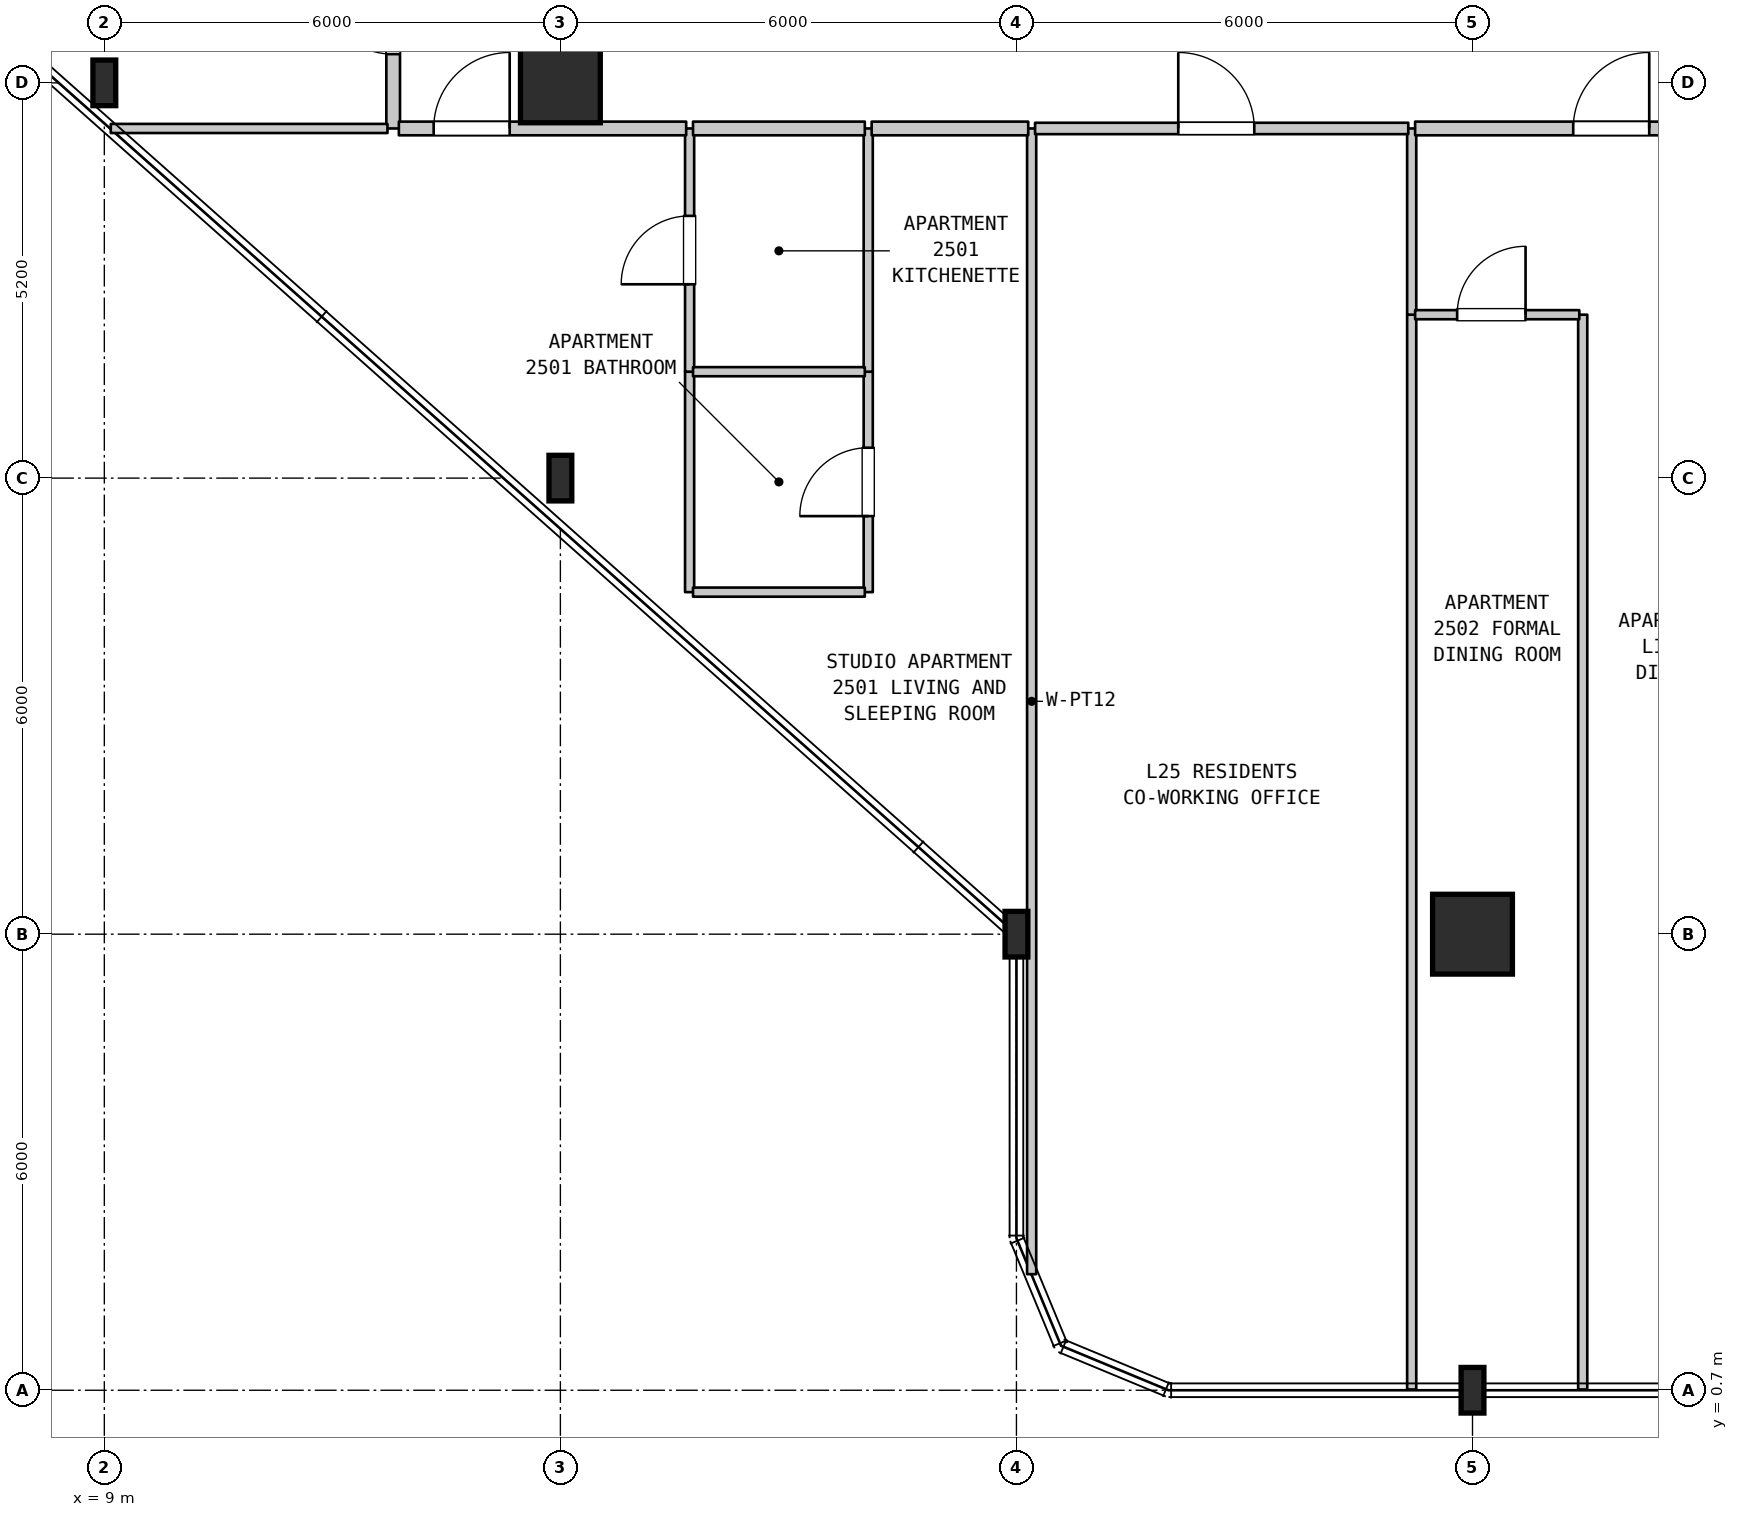
"""IFC4 building model, lengths in metres.
Left out: names, types, materials, properties, quantities, classifications, styles, units other than length and angle.
Written with IfcOpenShell. Run it as: python <this file> out.ifc"""

import sys

from ifc_helpers import new_model, si_unit, direction, frame, frame_2d, origin, origin_2d, place, context, subcontext, project, spatial, rectangle, i_section, extrude, element, fill, save


model = new_model("IFC4")
c1 = context("Model", 3, precision=1e-05, world=origin(), true_north=direction((0.0, 1.0)))
c2 = subcontext(c1, "Body", "Model", "MODEL_VIEW")
j1 = project(units=[si_unit("LENGTHUNIT", "METRE"), si_unit("PLANEANGLEUNIT", "RADIAN")], contexts=[c1])
p1 = place(None, origin())
s1 = spatial("IfcSite", under=j1, at=p1, CompositionType="ELEMENT")
p2 = place(p1, origin())
s2 = spatial("IfcBuilding", under=s1, at=p2, CompositionType="ELEMENT")
p3 = place(p2, frame((0.0, 0.0, 105.7)))
s3 = spatial("IfcBuildingStorey", under=s2, at=p3, CompositionType="ELEMENT", Elevation=105.7)
for number, where, z_axis, x_axis in (
    (1, (9.0, 17.9, 0.0), (0.0, 0.0, 1.0), (1.0, 0.0, 0.0)),
    (2, (15.0, 12.7, 0.0), (0.0, 0.0, 1.0), (1.0, 0.0, 0.0)),
):
    element("IfcColumn", number, at=place(p3, frame(where, z_axis=z_axis, x_axis=x_axis)), inside=s3, PredefinedType="COLUMN", context=c2, shape_type="SweptSolid", body=[
        extrude(i_section(OverallWidth=0.3, OverallDepth=0.6, WebThickness=0.015, FlangeThickness=0.03, FilletRadius=0.027, at=origin_2d()), origin(), (0.0, 0.0, 1.0), 3.7),
    ])
p4 = place(p3, frame((15.0, 17.9, 0.0), z_axis=(0.0, 0.0, 1.0), x_axis=(1.0, 0.0, 0.0)))
e3 = element("IfcColumn", 3, at=p4, inside=s3, PredefinedType="COLUMN", context=c2, shape_type="SweptSolid", body=[
    extrude(rectangle(XDim=1.05, YDim=1.05, at=origin_2d()), origin(), (0.0, 0.0, 1.0), 3.7),
])
for number, where, z_axis, x_axis in (
    (4, (21.0, 6.7, 0.0), (0.0, 0.0, 1.0), (1.0, 0.0, 0.0)),
    (5, (27.0, 0.7, 0.0), (0.0, 0.0, 1.0), (1.0, 0.0, 0.0)),
):
    element("IfcColumn", number, at=place(p3, frame(where, z_axis=z_axis, x_axis=x_axis)), inside=s3, PredefinedType="COLUMN", context=c2, shape_type="SweptSolid", body=[
        extrude(i_section(OverallWidth=0.3, OverallDepth=0.6, WebThickness=0.015, FlangeThickness=0.03, FilletRadius=0.027, at=origin_2d()), origin(), (0.0, 0.0, 1.0), 3.7),
    ])
p5 = place(p3, frame((27.0, 6.7, 0.0), z_axis=(0.0, 0.0, 1.0), x_axis=(1.0, 0.0, 0.0)))
e6 = element("IfcColumn", 6, at=p5, inside=s3, PredefinedType="COLUMN", context=c2, shape_type="SweptSolid", body=[
    extrude(rectangle(XDim=1.05, YDim=1.05, at=origin_2d()), origin(), (0.0, 0.0, 1.0), 3.7),
])
p6 = place(p3, frame((12.8, 17.3, 0.0), z_axis=(0.0, 0.0, 1.0), x_axis=(0.0, 1.0, 0.0)))
e7 = element("IfcWall", 7, at=p6, inside=s3, PredefinedType="STANDARD", context=c2, shape_type="SweptSolid", body=[
    extrude(rectangle(XDim=3.1, YDim=0.18, at=frame_2d((1.55, 0.0))), origin(), (0.0, 0.0, 1.0), 3.385),
])
p7 = place(p6, frame((0.978, 0.0, 0.0)))
e8 = element("IfcOpeningElement", 8, at=p7, cuts=e7, PredefinedType="OPENING", context=c2, shape_type="SweptSolid", body=[
    extrude(rectangle(XDim=1.0, YDim=2.15, at=frame_2d((0.5, 1.075))), frame((0.0, 0.1, 0.0), z_axis=(0.0, -1.0, 0.0), x_axis=(1.0, 0.0, 0.0)), (0.0, 0.0, 1.0), 0.2),
])
p8 = place(p3, frame((16.7, 11.2, 0.0), z_axis=(0.0, 0.0, 1.0), x_axis=(0.0, 1.0, 0.0)))
e9 = element("IfcWall", 9, at=p8, inside=s3, PredefinedType="PARTITIONING", context=c2, shape_type="SweptSolid", body=[
    extrude(rectangle(XDim=2.9, YDim=0.12, at=frame_2d((1.45, 0.0))), origin(), (0.0, 0.0, 1.0), 3.385),
])
p9 = place(p3, frame((16.7, 14.1, 0.0), z_axis=(0.0, 0.0, 1.0), x_axis=(0.0, 1.0, 0.0)))
e10 = element("IfcWall", 10, at=p9, inside=s3, PredefinedType="PARTITIONING", context=c2, shape_type="SweptSolid", body=[
    extrude(rectangle(XDim=3.2, YDim=0.12, at=frame_2d((1.6, 0.0))), origin(), (0.0, 0.0, 1.0), 3.385),
])
p10 = place(p9, frame((1.15, 0.0, 0.0)))
e11 = element("IfcOpeningElement", 11, at=p10, cuts=e10, PredefinedType="OPENING", context=c2, shape_type="SweptSolid", body=[
    extrude(rectangle(XDim=0.9, YDim=2.15, at=frame_2d((0.45, 1.075))), frame((0.0, 0.07, 0.0), z_axis=(0.0, -1.0, 0.0), x_axis=(1.0, 0.0, 0.0)), (0.0, 0.0, 1.0), 0.14),
])
p11 = place(p3, frame((19.05, 11.2, 0.0), z_axis=(0.0, 0.0, 1.0), x_axis=(0.0, 1.0, 0.0)))
e12 = element("IfcWall", 12, at=p11, inside=s3, PredefinedType="PARTITIONING", context=c2, shape_type="SweptSolid", body=[
    extrude(rectangle(XDim=2.9, YDim=0.12, at=frame_2d((1.45, 0.0))), origin(), (0.0, 0.0, 1.0), 3.385),
])
p12 = place(p11, frame((1.0, 0.0, 0.0)))
e13 = element("IfcOpeningElement", 13, at=p12, cuts=e12, PredefinedType="OPENING", context=c2, shape_type="SweptSolid", body=[
    extrude(rectangle(XDim=0.9, YDim=2.1, at=frame_2d((0.45, 1.05))), frame((0.0, 0.07, 0.0), z_axis=(0.0, -1.0, 0.0), x_axis=(1.0, 0.0, 0.0)), (0.0, 0.0, 1.0), 0.14),
])
p13 = place(p3, frame((19.05, 14.1, 0.0), z_axis=(0.0, 0.0, 1.0), x_axis=(0.0, 1.0, 0.0)))
e14 = element("IfcWall", 14, at=p13, inside=s3, PredefinedType="PARTITIONING", context=c2, shape_type="SweptSolid", body=[
    extrude(rectangle(XDim=3.2, YDim=0.12, at=frame_2d((1.6, 0.0))), origin(), (0.0, 0.0, 1.0), 3.385),
])
p14 = place(p3, frame((21.2, 2.227, 0.0), z_axis=(0.0, 0.0, 1.0), x_axis=(0.0, 1.0, 0.0)))
e15 = element("IfcWall", 15, at=p14, inside=s3, PredefinedType="PARTITIONING", context=c2, shape_type="SweptSolid", body=[
    extrude(rectangle(XDim=15.073, YDim=0.12, at=frame_2d((7.537, 0.0))), origin(), (0.0, 0.0, 1.0), 3.385),
])
p15 = place(p3, frame((26.2, 0.71, 0.0), z_axis=(0.0, 0.0, 1.0), x_axis=(0.0, 1.0, 0.0)))
e16 = element("IfcWall", 16, at=p15, inside=s3, PredefinedType="PARTITIONING", context=c2, shape_type="SweptSolid", body=[
    extrude(rectangle(XDim=14.14, YDim=0.12, at=frame_2d((7.07, 0.0))), origin(), (0.0, 0.0, 1.0), 3.385),
])
p16 = place(p3, frame((26.2, 14.85, 0.0), z_axis=(0.0, 0.0, 1.0), x_axis=(0.0, 1.0, 0.0)))
e17 = element("IfcWall", 17, at=p16, inside=s3, PredefinedType="PARTITIONING", context=c2, shape_type="SweptSolid", body=[
    extrude(rectangle(XDim=2.45, YDim=0.12, at=frame_2d((1.225, 0.0))), origin(), (0.0, 0.0, 1.0), 3.385),
])
p17 = place(p3, frame((28.45, 0.71, 0.0), z_axis=(0.0, 0.0, 1.0), x_axis=(0.0, 1.0, 0.0)))
e18 = element("IfcWall", 18, at=p17, inside=s3, PredefinedType="PARTITIONING", context=c2, shape_type="SweptSolid", body=[
    extrude(rectangle(XDim=14.14, YDim=0.12, at=frame_2d((7.07, 0.0))), origin(), (0.0, 0.0, 1.0), 3.385),
])
for number, where, z_axis, x_axis in (
    (19, (16.745, 11.2, 0.0), (0.0, 0.0, 1.0), (1.0, 0.0, 0.0)),
    (20, (16.745, 14.1, 0.0), (0.0, 0.0, 1.0), (1.0, 0.0, 0.0)),
):
    element("IfcWall", number, at=place(p3, frame(where, z_axis=z_axis, x_axis=x_axis)), inside=s3, PredefinedType="PARTITIONING", context=c2, shape_type="SweptSolid", body=[
        extrude(rectangle(XDim=2.26, YDim=0.12, at=frame_2d((1.13, 0.0))), origin(), (0.0, 0.0, 1.0), 3.385),
    ])
p18 = place(p3, frame((26.245, 14.85, 0.0), z_axis=(0.0, 0.0, 1.0), x_axis=(1.0, 0.0, 0.0)))
e21 = element("IfcWall", 21, at=p18, inside=s3, PredefinedType="PARTITIONING", context=c2, shape_type="SweptSolid", body=[
    extrude(rectangle(XDim=2.16, YDim=0.12, at=frame_2d((1.08, 0.0))), origin(), (0.0, 0.0, 1.0), 3.385),
])
p19 = place(p18, frame((0.553, 0.0, 0.0)))
e22 = element("IfcOpeningElement", 22, at=p19, cuts=e21, PredefinedType="OPENING", context=c2, shape_type="SweptSolid", body=[
    extrude(rectangle(XDim=0.9, YDim=2.15, at=frame_2d((0.45, 1.075))), frame((0.0, 0.07, 0.0), z_axis=(0.0, -1.0, 0.0), x_axis=(1.0, 0.0, 0.0)), (0.0, 0.0, 1.0), 0.14),
])
p20 = place(p3, frame((9.085, 17.3, 0.0), z_axis=(0.0, 0.0, 1.0), x_axis=(1.0, 0.0, 0.0)))
e23 = element("IfcWall", 23, at=p20, inside=s3, PredefinedType="PARTITIONING", context=c2, shape_type="SweptSolid", body=[
    extrude(rectangle(XDim=3.64, YDim=0.12, at=frame_2d((1.82, 0.0))), origin(), (0.0, 0.0, 1.0), 3.385),
])
p21 = place(p3, frame((12.875, 17.3, 0.0), z_axis=(0.0, 0.0, 1.0), x_axis=(1.0, 0.0, 0.0)))
e24 = element("IfcWall", 24, at=p21, inside=s3, PredefinedType="STANDARD", context=c2, shape_type="SweptSolid", body=[
    extrude(rectangle(XDim=3.78, YDim=0.18, at=frame_2d((1.89, 0.0))), origin(), (0.0, 0.0, 1.0), 3.385),
])
p22 = place(p21, frame((0.458, 0.0, 0.0)))
e25 = element("IfcOpeningElement", 25, at=p22, cuts=e24, PredefinedType="OPENING", context=c2, shape_type="SweptSolid", body=[
    extrude(rectangle(XDim=1.0, YDim=2.15, at=frame_2d((0.5, 1.075))), frame((0.0, 0.1, 0.0), z_axis=(0.0, -1.0, 0.0), x_axis=(1.0, 0.0, 0.0)), (0.0, 0.0, 1.0), 0.2),
])
p23 = place(p3, frame((16.745, 17.3, 0.0), z_axis=(0.0, 0.0, 1.0), x_axis=(1.0, 0.0, 0.0)))
e26 = element("IfcWall", 26, at=p23, inside=s3, PredefinedType="STANDARD", context=c2, shape_type="SweptSolid", body=[
    extrude(rectangle(XDim=2.26, YDim=0.18, at=frame_2d((1.13, 0.0))), origin(), (0.0, 0.0, 1.0), 3.385),
])
p24 = place(p3, frame((19.095, 17.3, 0.0), z_axis=(0.0, 0.0, 1.0), x_axis=(1.0, 0.0, 0.0)))
e27 = element("IfcWall", 27, at=p24, inside=s3, PredefinedType="STANDARD", context=c2, shape_type="SweptSolid", body=[
    extrude(rectangle(XDim=2.06, YDim=0.18, at=frame_2d((1.03, 0.0))), origin(), (0.0, 0.0, 1.0), 3.385),
])
p25 = place(p3, frame((21.245, 17.3, 0.0), z_axis=(0.0, 0.0, 1.0), x_axis=(1.0, 0.0, 0.0)))
e28 = element("IfcWall", 28, at=p25, inside=s3, PredefinedType="STANDARD", context=c2, shape_type="SweptSolid", body=[
    extrude(rectangle(XDim=4.91, YDim=0.15, at=frame_2d((2.455, 0.0))), origin(), (0.0, 0.0, 1.0), 3.385),
])
p26 = place(p25, frame((1.884, 0.0, 0.0)))
e29 = element("IfcOpeningElement", 29, at=p26, cuts=e28, PredefinedType="OPENING", context=c2, shape_type="SweptSolid", body=[
    extrude(rectangle(XDim=1.0, YDim=2.15, at=frame_2d((0.5, 1.075))), frame((0.0, 0.085, 0.0), z_axis=(0.0, -1.0, 0.0), x_axis=(1.0, 0.0, 0.0)), (0.0, 0.0, 1.0), 0.17),
])
p27 = place(p3, frame((26.245, 17.3, 0.0), z_axis=(0.0, 0.0, 1.0), x_axis=(1.0, 0.0, 0.0)))
e30 = element("IfcWall", 30, at=p27, inside=s3, PredefinedType="STANDARD", context=c2, shape_type="SweptSolid", body=[
    extrude(rectangle(XDim=5.095, YDim=0.18, at=frame_2d((2.547, 0.0))), origin(), (0.0, 0.0, 1.0), 3.385),
])
p28 = place(p27, frame((2.08, 0.0, 0.0)))
e31 = element("IfcOpeningElement", 31, at=p28, cuts=e30, PredefinedType="OPENING", context=c2, shape_type="SweptSolid", body=[
    extrude(rectangle(XDim=1.0, YDim=2.15, at=frame_2d((0.5, 1.075))), frame((0.0, 0.1, 0.0), z_axis=(0.0, -1.0, 0.0), x_axis=(1.0, 0.0, 0.0)), (0.0, 0.0, 1.0), 0.2),
])
p29 = place(p7, origin())
e32 = element("IfcDoor", 32, at=p29, inside=s3, OperationType="SINGLE_SWING_RIGHT", PredefinedType="DOOR", context=c2, shape_type="SweptSolid", body=[
    extrude(rectangle(XDim=1.0, YDim=2.15, at=frame_2d((0.5, 1.075))), frame((0.0, 0.025, 0.0), z_axis=(0.0, -1.0, 0.0), x_axis=(1.0, 0.0, 0.0)), (0.0, 0.0, 1.0), 0.05),
])
fill(e8, e32)
p30 = place(p10, origin())
e33 = element("IfcDoor", 33, at=p30, inside=s3, OperationType="SINGLE_SWING_LEFT", PredefinedType="DOOR", context=c2, shape_type="SweptSolid", body=[
    extrude(rectangle(XDim=0.9, YDim=2.15, at=frame_2d((0.45, 1.075))), frame((0.0, 0.025, 0.0), z_axis=(0.0, -1.0, 0.0), x_axis=(1.0, 0.0, 0.0)), (0.0, 0.0, 1.0), 0.05),
])
fill(e11, e33)
p31 = place(p12, origin())
e34 = element("IfcDoor", 34, at=p31, inside=s3, OperationType="SINGLE_SWING_LEFT", PredefinedType="DOOR", context=c2, shape_type="SweptSolid", body=[
    extrude(rectangle(XDim=0.9, YDim=2.1, at=frame_2d((0.45, 1.05))), frame((0.0, 0.025, 0.0), z_axis=(0.0, -1.0, 0.0), x_axis=(1.0, 0.0, 0.0)), (0.0, 0.0, 1.0), 0.05),
])
fill(e13, e34)
p32 = place(p19, origin())
e35 = element("IfcDoor", 35, at=p32, inside=s3, OperationType="SINGLE_SWING_RIGHT", PredefinedType="DOOR", context=c2, shape_type="SweptSolid", body=[
    extrude(rectangle(XDim=0.9, YDim=2.15, at=frame_2d((0.45, 1.075))), frame((0.0, 0.025, 0.0), z_axis=(0.0, -1.0, 0.0), x_axis=(1.0, 0.0, 0.0)), (0.0, 0.0, 1.0), 0.05),
])
fill(e22, e35)
p33 = place(p22, origin())
e36 = element("IfcDoor", 36, at=p33, inside=s3, OperationType="SINGLE_SWING_RIGHT", PredefinedType="DOOR", context=c2, shape_type="SweptSolid", body=[
    extrude(rectangle(XDim=1.0, YDim=2.15, at=frame_2d((0.5, 1.075))), frame((0.0, 0.025, 0.0), z_axis=(0.0, -1.0, 0.0), x_axis=(1.0, 0.0, 0.0)), (0.0, 0.0, 1.0), 0.05),
])
fill(e25, e36)
p34 = place(p26, origin())
e37 = element("IfcDoor", 37, at=p34, inside=s3, OperationType="SINGLE_SWING_LEFT", PredefinedType="DOOR", context=c2, shape_type="SweptSolid", body=[
    extrude(rectangle(XDim=1.0, YDim=2.15, at=frame_2d((0.5, 1.075))), frame((0.0, 0.025, 0.0), z_axis=(0.0, -1.0, 0.0), x_axis=(1.0, 0.0, 0.0)), (0.0, 0.0, 1.0), 0.05),
])
fill(e29, e37)
p35 = place(p28, origin())
e38 = element("IfcDoor", 38, at=p35, inside=s3, OperationType="SINGLE_SWING_RIGHT", PredefinedType="DOOR", context=c2, shape_type="SweptSolid", body=[
    extrude(rectangle(XDim=1.0, YDim=2.15, at=frame_2d((0.5, 1.075))), frame((0.0, 0.025, 0.0), z_axis=(0.0, -1.0, 0.0), x_axis=(1.0, 0.0, 0.0)), (0.0, 0.0, 1.0), 0.05),
])
fill(e31, e38)
save(model, sys.argv[1])
